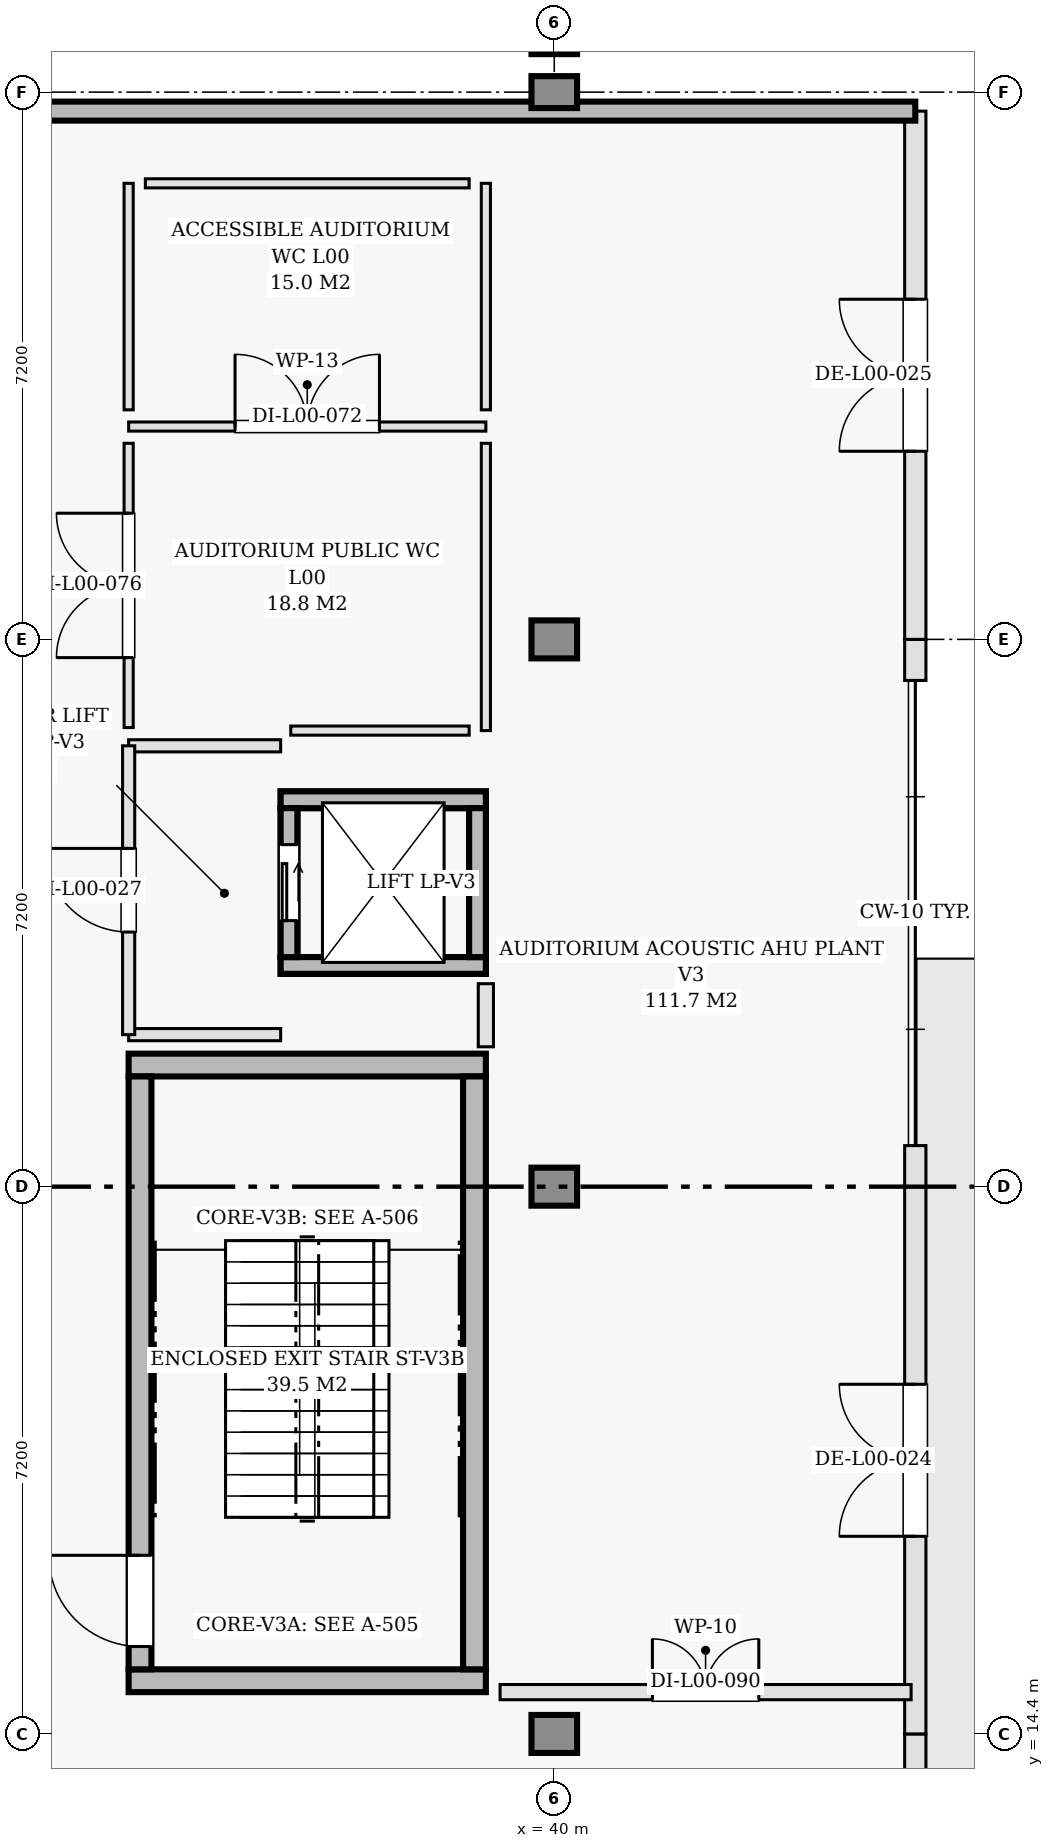
"""IFC4 building model, lengths in metres.
Left out: names, types, materials, properties, quantities, classifications, styles, units other than length and angle.
Written with IfcOpenShell. Run it as: python <this file> out.ifc"""

import sys

from ifc_helpers import new_model, si_unit, direction, frame, frame_2d, origin, origin_2d, place, context, subcontext, project, spatial, rectangle, extrude, element, fill, save


model = new_model("IFC4")
c1 = context("Model", 3, precision=1e-05, world=origin(), true_north=direction((0.0, 1.0)))
c2 = subcontext(c1, "Body", "Model", "MODEL_VIEW")
j1 = project(units=[si_unit("LENGTHUNIT", "METRE"), si_unit("PLANEANGLEUNIT", "RADIAN")], contexts=[c1])
p1 = place(None, origin())
s1 = spatial("IfcSite", under=j1, at=p1, CompositionType="ELEMENT")
p2 = place(p1, origin())
s2 = spatial("IfcBuilding", under=s1, at=p2, CompositionType="ELEMENT")
p3 = place(p2, origin())
s3 = spatial("IfcBuildingStorey", under=s2, at=p3, CompositionType="ELEMENT", Elevation=0.0)
for number, where, z_axis, x_axis in (
    (1, (40.0, 14.4, 0.0), (0.0, 0.0, 1.0), (1.0, 0.0, 0.0)),
    (2, (40.0, 21.6, 0.0), (0.0, 0.0, 1.0), (1.0, 0.0, 0.0)),
    (3, (40.0, 28.8, 0.0), (0.0, 0.0, 1.0), (1.0, 0.0, 0.0)),
):
    element("IfcColumn", number, at=place(p3, frame(where, z_axis=z_axis, x_axis=x_axis)), inside=s3, PredefinedType="COLUMN", context=c2, shape_type="SweptSolid", body=[
        extrude(rectangle(XDim=0.5, YDim=0.5, at=origin_2d()), origin(), (0.0, 0.0, 1.0), 4.8),
    ])
p4 = place(p3, frame((40.0, 36.0, 0.0), z_axis=(0.0, 0.0, 1.0), x_axis=(1.0, 0.0, 0.0)))
e4 = element("IfcColumn", 4, at=p4, inside=s3, PredefinedType="COLUMN", context=c2, shape_type="SweptSolid", body=[
    extrude(rectangle(XDim=0.42, YDim=0.42, at=origin_2d()), origin(), (0.0, 0.0, 1.0), 4.8),
])
p5 = place(p3, frame((40.0, 36.75, 0.0), z_axis=(0.0, 0.0, 1.0), x_axis=(1.0, 0.0, 0.0)))
e5 = element("IfcColumn", 5, at=p5, inside=s3, PredefinedType="COLUMN", context=c2, shape_type="SweptSolid", body=[
    extrude(rectangle(XDim=0.5, YDim=0.5, at=origin_2d()), origin(), (0.0, 0.0, 1.0), 4.8),
])
p6 = place(p3, frame((44.75, 7.2, 0.0), z_axis=(0.0, 0.0, 1.0), x_axis=(0.0, 1.0, 0.0)))
e6 = element("IfcWall", 6, at=p6, inside=s3, PredefinedType="SOLIDWALL", context=c2, shape_type="SweptSolid", body=[
    extrude(rectangle(XDim=7.2, YDim=0.28, at=frame_2d((3.6, 0.0))), origin(), (0.0, 0.0, 1.0), 3.905),
])
p7 = place(p6, frame((4.4, 0.0, 0.0)))
e7 = element("IfcOpeningElement", 7, at=p7, cuts=e6, PredefinedType="OPENING", context=c2, shape_type="SweptSolid", body=[
    extrude(rectangle(XDim=1.8, YDim=2.2, at=frame_2d((0.9, 1.1))), frame((0.0, 0.15, 0.0), z_axis=(0.0, -1.0, 0.0), x_axis=(1.0, 0.0, 0.0)), (0.0, 0.0, 1.0), 0.3),
])
p8 = place(p3, frame((44.75, 14.4, 0.0), z_axis=(0.0, 0.0, 1.0), x_axis=(0.0, 1.0, 0.0)))
e8 = element("IfcWall", 8, at=p8, inside=s3, PredefinedType="SOLIDWALL", context=c2, shape_type="SweptSolid", body=[
    extrude(rectangle(XDim=7.2, YDim=0.28, at=frame_2d((3.6, 0.0))), origin(), (0.0, 0.0, 1.0), 3.905),
])
p9 = place(p8, frame((2.6, 0.0, 0.0)))
e9 = element("IfcOpeningElement", 9, at=p9, cuts=e8, PredefinedType="OPENING", context=c2, shape_type="SweptSolid", body=[
    extrude(rectangle(XDim=2.0, YDim=2.3, at=frame_2d((1.0, 1.15))), frame((0.0, 0.15, 0.0), z_axis=(0.0, -1.0, 0.0), x_axis=(1.0, 0.0, 0.0)), (0.0, 0.0, 1.0), 0.3),
])
p10 = place(p3, frame((44.75, 21.6, 0.0), z_axis=(0.0, 0.0, 1.0), x_axis=(0.0, 1.0, 0.0)))
e10 = element("IfcWall", 10, at=p10, inside=s3, PredefinedType="SOLIDWALL", context=c2, shape_type="SweptSolid", body=[
    extrude(rectangle(XDim=0.54, YDim=0.28, at=frame_2d((0.27, 0.0))), origin(), (0.0, 0.0, 1.0), 3.905),
])
p11 = place(p3, frame((44.75, 28.26, 0.0), z_axis=(0.0, 0.0, 1.0), x_axis=(0.0, 1.0, 0.0)))
e11 = element("IfcWall", 11, at=p11, inside=s3, PredefinedType="SOLIDWALL", context=c2, shape_type="SweptSolid", body=[
    extrude(rectangle(XDim=0.54, YDim=0.28, at=frame_2d((0.27, 0.0))), origin(), (0.0, 0.0, 1.0), 3.905),
])
p12 = place(p3, frame((44.75, 28.8, 0.0), z_axis=(0.0, 0.0, 1.0), x_axis=(0.0, 1.0, 0.0)))
e12 = element("IfcWall", 12, at=p12, inside=s3, PredefinedType="SOLIDWALL", context=c2, shape_type="SweptSolid", body=[
    extrude(rectangle(XDim=6.95, YDim=0.28, at=frame_2d((3.475, 0.0))), origin(), (0.0, 0.0, 1.0), 3.905),
])
p13 = place(p12, frame((2.475, 0.0, 0.0)))
e13 = element("IfcOpeningElement", 13, at=p13, cuts=e12, PredefinedType="OPENING", context=c2, shape_type="SweptSolid", body=[
    extrude(rectangle(XDim=2.0, YDim=2.3, at=frame_2d((1.0, 1.15))), frame((0.0, 0.15, 0.0), z_axis=(0.0, -1.0, 0.0), x_axis=(1.0, 0.0, 0.0)), (0.0, 0.0, 1.0), 0.3),
])
p14 = place(p3, frame((44.75, 35.75, 0.0), z_axis=(0.0, 0.0, 1.0), x_axis=(-1.0, 0.0, 0.0)))
e14 = element("IfcWall", 14, at=p14, inside=s3, PredefinedType="SHEAR", context=c2, shape_type="SweptSolid", body=[
    extrude(rectangle(XDim=41.75, YDim=0.25, at=frame_2d((20.875, 0.0))), origin(), (0.0, 0.0, 1.0), 4.52),
])
for number, where, z_axis, x_axis in (
    (15, (34.4, 15.1, 0.0), (0.0, 0.0, 1.0), (1.0, 0.0, 0.0)),
    (16, (34.4, 23.2, 0.0), (0.0, 0.0, 1.0), (1.0, 0.0, 0.0)),
):
    element("IfcWall", number, at=place(p3, frame(where, z_axis=z_axis, x_axis=x_axis)), inside=s3, PredefinedType="SHEAR", context=c2, shape_type="SweptSolid", body=[
        extrude(rectangle(XDim=4.7, YDim=0.3, at=frame_2d((2.35, 0.0))), origin(), (0.0, 0.0, 1.0), 4.52),
    ])
p15 = place(p3, frame((34.55, 15.25, 0.0), z_axis=(0.0, 0.0, 1.0), x_axis=(0.0, 1.0, 0.0)))
e17 = element("IfcWall", 17, at=p15, inside=s3, PredefinedType="SHEAR", context=c2, shape_type="SweptSolid", body=[
    extrude(rectangle(XDim=7.8, YDim=0.3, at=frame_2d((3.9, 0.0))), origin(), (0.0, 0.0, 1.0), 4.52),
])
p16 = place(p15, frame((0.3, 0.0, 0.0)))
e18 = element("IfcOpeningElement", 18, at=p16, cuts=e17, PredefinedType="OPENING", context=c2, shape_type="SweptSolid", body=[
    extrude(rectangle(XDim=1.2, YDim=2.15, at=frame_2d((0.6, 1.075))), frame((0.0, 0.16, 0.0), z_axis=(0.0, -1.0, 0.0), x_axis=(1.0, 0.0, 0.0)), (0.0, 0.0, 1.0), 0.32),
])
p17 = place(p3, frame((38.95, 15.25, 0.0), z_axis=(0.0, 0.0, 1.0), x_axis=(0.0, 1.0, 0.0)))
e19 = element("IfcWall", 19, at=p17, inside=s3, PredefinedType="SHEAR", context=c2, shape_type="SweptSolid", body=[
    extrude(rectangle(XDim=7.8, YDim=0.3, at=frame_2d((3.9, 0.0))), origin(), (0.0, 0.0, 1.0), 4.52),
])
for number, where, z_axis, x_axis in (
    (20, (36.4, 24.51, -1.4), (0.0, 0.0, 1.0), (1.0, 0.0, 0.0)),
    (21, (36.4, 26.69, -1.4), (0.0, 0.0, 1.0), (1.0, 0.0, 0.0)),
):
    element("IfcWall", number, at=place(p3, frame(where, z_axis=z_axis, x_axis=x_axis)), inside=s3, PredefinedType="SHEAR", context=c2, shape_type="SweptSolid", body=[
        extrude(rectangle(XDim=2.7, YDim=0.22, at=frame_2d((1.35, 0.0))), origin(), (0.0, 0.0, 1.0), 1.05),
    ])
for number, where, z_axis, x_axis in (
    (22, (36.51, 24.62, -1.4), (0.0, 0.0, 1.0), (0.0, 1.0, 0.0)),
    (23, (38.99, 24.62, -1.4), (0.0, 0.0, 1.0), (0.0, 1.0, 0.0)),
):
    element("IfcWall", number, at=place(p3, frame(where, z_axis=z_axis, x_axis=x_axis)), inside=s3, PredefinedType="SHEAR", context=c2, shape_type="SweptSolid", body=[
        extrude(rectangle(XDim=1.96, YDim=0.22, at=frame_2d((0.98, 0.0))), origin(), (0.0, 0.0, 1.0), 1.05),
    ])
for number, where, z_axis, x_axis in (
    (24, (36.4, 24.51, 0.0), (0.0, 0.0, 1.0), (1.0, 0.0, 0.0)),
    (25, (36.4, 26.69, 0.0), (0.0, 0.0, 1.0), (1.0, 0.0, 0.0)),
):
    element("IfcWall", number, at=place(p3, frame(where, z_axis=z_axis, x_axis=x_axis)), inside=s3, PredefinedType="SHEAR", context=c2, shape_type="SweptSolid", body=[
        extrude(rectangle(XDim=2.7, YDim=0.22, at=frame_2d((1.35, 0.0))), origin(), (0.0, 0.0, 1.0), 4.52),
    ])
p18 = place(p3, frame((36.51, 24.62, 0.0), z_axis=(0.0, 0.0, 1.0), x_axis=(0.0, 1.0, 0.0)))
e26 = element("IfcWall", 26, at=p18, inside=s3, PredefinedType="SHEAR", context=c2, shape_type="SweptSolid", body=[
    extrude(rectangle(XDim=1.96, YDim=0.22, at=frame_2d((0.98, 0.0))), origin(), (0.0, 0.0, 1.0), 4.52),
])
p19 = place(p18, frame((0.48, 0.0, 0.0)))
e27 = element("IfcOpeningElement", 27, at=p19, cuts=e26, PredefinedType="OPENING", context=c2, shape_type="SweptSolid", body=[
    extrude(rectangle(XDim=1.0, YDim=2.15, at=frame_2d((0.5, 1.075))), frame((0.0, 0.12, 0.0), z_axis=(0.0, -1.0, 0.0), x_axis=(1.0, 0.0, 0.0)), (0.0, 0.0, 1.0), 0.24),
])
p20 = place(p3, frame((38.99, 24.62, 0.0), z_axis=(0.0, 0.0, 1.0), x_axis=(0.0, 1.0, 0.0)))
e28 = element("IfcWall", 28, at=p20, inside=s3, PredefinedType="SHEAR", context=c2, shape_type="SweptSolid", body=[
    extrude(rectangle(XDim=1.96, YDim=0.22, at=frame_2d((0.98, 0.0))), origin(), (0.0, 0.0, 1.0), 4.52),
])
for number, where, z_axis, x_axis in (
    (29, (34.4, 23.6, 0.0), (0.0, 0.0, 1.0), (1.0, 0.0, 0.0)),
    (30, (34.4, 27.4, 0.0), (0.0, 0.0, 1.0), (1.0, 0.0, 0.0)),
):
    element("IfcWall", number, at=place(p3, frame(where, z_axis=z_axis, x_axis=x_axis)), inside=s3, PredefinedType="PARTITIONING", context=c2, shape_type="SweptSolid", body=[
        extrude(rectangle(XDim=2.0, YDim=0.16, at=frame_2d((1.0, 0.0))), origin(), (0.0, 0.0, 1.0), 4.52),
    ])
p21 = place(p3, frame((34.4, 23.6, 0.0), z_axis=(0.0, 0.0, 1.0), x_axis=(0.0, 1.0, 0.0)))
e31 = element("IfcWall", 31, at=p21, inside=s3, PredefinedType="PARTITIONING", context=c2, shape_type="SweptSolid", body=[
    extrude(rectangle(XDim=3.8, YDim=0.16, at=frame_2d((1.9, 0.0))), origin(), (0.0, 0.0, 1.0), 4.235),
])
p22 = place(p21, frame((1.35, 0.0, 0.0)))
e32 = element("IfcOpeningElement", 32, at=p22, cuts=e31, PredefinedType="OPENING", context=c2, shape_type="SweptSolid", body=[
    extrude(rectangle(XDim=1.1, YDim=2.15, at=frame_2d((0.55, 1.075))), frame((0.0, 0.09, 0.0), z_axis=(0.0, -1.0, 0.0), x_axis=(1.0, 0.0, 0.0)), (0.0, 0.0, 1.0), 0.18),
])
p23 = place(p3, frame((34.4, 31.6, 0.0), z_axis=(0.0, 0.0, 1.0), x_axis=(1.0, 0.0, 0.0)))
e33 = element("IfcWall", 33, at=p23, inside=s3, PredefinedType="PARTITIONING", context=c2, shape_type="SweptSolid", body=[
    extrude(rectangle(XDim=4.7, YDim=0.12, at=frame_2d((2.35, 0.0))), origin(), (0.0, 0.0, 1.0), 4.52),
])
p24 = place(p23, frame((1.4, 0.0, 0.0)))
e34 = element("IfcOpeningElement", 34, at=p24, cuts=e33, PredefinedType="OPENING", context=c2, shape_type="SweptSolid", body=[
    extrude(rectangle(XDim=1.9, YDim=2.25, at=frame_2d((0.95, 1.125))), frame((0.0, 0.07, 0.0), z_axis=(0.0, -1.0, 0.0), x_axis=(1.0, 0.0, 0.0)), (0.0, 0.0, 1.0), 0.14),
])
for number, where, z_axis, x_axis in (
    (35, (39.1, 31.82, 0.0), (0.0, 0.0, 1.0), (0.0, 1.0, 0.0)),
    (36, (34.4, 31.82, 0.0), (0.0, 0.0, 1.0), (0.0, 1.0, 0.0)),
):
    element("IfcWall", number, at=place(p3, frame(where, z_axis=z_axis, x_axis=x_axis)), inside=s3, PredefinedType="PARTITIONING", context=c2, shape_type="SweptSolid", body=[
        extrude(rectangle(XDim=2.98, YDim=0.12, at=frame_2d((1.49, 0.0))), origin(), (0.0, 0.0, 1.0), 4.235),
    ])
p25 = place(p3, frame((34.62, 34.8, 0.0), z_axis=(0.0, 0.0, 1.0), x_axis=(1.0, 0.0, 0.0)))
e37 = element("IfcWall", 37, at=p25, inside=s3, PredefinedType="PARTITIONING", context=c2, shape_type="SweptSolid", body=[
    extrude(rectangle(XDim=4.26, YDim=0.12, at=frame_2d((2.13, 0.0))), origin(), (0.0, 0.0, 1.0), 4.52),
])
p26 = place(p3, frame((39.1, 27.6, 0.0), z_axis=(0.0, 0.0, 1.0), x_axis=(0.0, 1.0, 0.0)))
e38 = element("IfcWall", 38, at=p26, inside=s3, PredefinedType="PARTITIONING", context=c2, shape_type="SweptSolid", body=[
    extrude(rectangle(XDim=3.78, YDim=0.12, at=frame_2d((1.89, 0.0))), origin(), (0.0, 0.0, 1.0), 3.905),
])
p27 = place(p3, frame((36.533, 27.6, 0.0), z_axis=(0.0, 0.0, 1.0), x_axis=(1.0, 0.0, 0.0)))
e39 = element("IfcWall", 39, at=p27, inside=s3, PredefinedType="PARTITIONING", context=c2, shape_type="SweptSolid", body=[
    extrude(rectangle(XDim=2.347, YDim=0.12, at=frame_2d((1.173, 0.0))), origin(), (0.0, 0.0, 1.0), 4.52),
])
p28 = place(p3, frame((34.4, 27.64, 0.0), z_axis=(0.0, 0.0, 1.0), x_axis=(0.0, 1.0, 0.0)))
e40 = element("IfcWall", 40, at=p28, inside=s3, PredefinedType="PARTITIONING", context=c2, shape_type="SweptSolid", body=[
    extrude(rectangle(XDim=3.74, YDim=0.12, at=frame_2d((1.87, 0.0))), origin(), (0.0, 0.0, 1.0), 3.905),
])
p29 = place(p28, frame((0.92, 0.0, 0.0)))
e41 = element("IfcOpeningElement", 41, at=p29, cuts=e40, PredefinedType="OPENING", context=c2, shape_type="SweptSolid", body=[
    extrude(rectangle(XDim=1.9, YDim=2.25, at=frame_2d((0.95, 1.125))), frame((0.0, 0.07, 0.0), z_axis=(0.0, -1.0, 0.0), x_axis=(1.0, 0.0, 0.0)), (0.0, 0.0, 1.0), 0.14),
])
p30 = place(p3, frame((39.287, 14.95, 0.0), z_axis=(0.0, 0.0, 1.0), x_axis=(1.0, 0.0, 0.0)))
e42 = element("IfcWall", 42, at=p30, inside=s3, PredefinedType="PARTITIONING", context=c2, shape_type="SweptSolid", body=[
    extrude(rectangle(XDim=5.408, YDim=0.2, at=frame_2d((2.704, 0.0))), origin(), (0.0, 0.0, 1.0), 3.955),
])
p31 = place(p30, frame((2.004, 0.0, 0.0)))
e43 = element("IfcOpeningElement", 43, at=p31, cuts=e42, PredefinedType="OPENING", context=c2, shape_type="SweptSolid", body=[
    extrude(rectangle(XDim=1.4, YDim=2.15, at=frame_2d((0.7, 1.075))), frame((0.0, 0.11, 0.0), z_axis=(0.0, -1.0, 0.0), x_axis=(1.0, 0.0, 0.0)), (0.0, 0.0, 1.0), 0.22),
])
p32 = place(p3, frame((39.1, 23.44, 0.0), z_axis=(0.0, 0.0, 1.0), x_axis=(0.0, 1.0, 0.0)))
e44 = element("IfcWall", 44, at=p32, inside=s3, PredefinedType="PARTITIONING", context=c2, shape_type="SweptSolid", body=[
    extrude(rectangle(XDim=0.83, YDim=0.2, at=frame_2d((0.415, 0.0))), origin(), (0.0, 0.0, 1.0), 4.235),
])
p33 = place(p9, origin())
e45 = element("IfcDoor", 45, at=p33, inside=s3, OperationType="DOUBLE_DOOR_SINGLE_SWING", PredefinedType="DOOR", context=c2, shape_type="SweptSolid", body=[
    extrude(rectangle(XDim=2.0, YDim=2.3, at=frame_2d((1.0, 1.15))), frame((0.0, 0.025, 0.0), z_axis=(0.0, -1.0, 0.0), x_axis=(1.0, 0.0, 0.0)), (0.0, 0.0, 1.0), 0.05),
])
fill(e9, e45)
p34 = place(p13, origin())
e46 = element("IfcDoor", 46, at=p34, inside=s3, OperationType="DOUBLE_DOOR_SINGLE_SWING", PredefinedType="DOOR", context=c2, shape_type="SweptSolid", body=[
    extrude(rectangle(XDim=2.0, YDim=2.3, at=frame_2d((1.0, 1.15))), frame((0.0, 0.025, 0.0), z_axis=(0.0, -1.0, 0.0), x_axis=(1.0, 0.0, 0.0)), (0.0, 0.0, 1.0), 0.05),
])
fill(e13, e46)
p35 = place(p16, origin())
e47 = element("IfcDoor", 47, at=p35, inside=s3, OperationType="SINGLE_SWING_RIGHT", PredefinedType="DOOR", context=c2, shape_type="SweptSolid", body=[
    extrude(rectangle(XDim=1.2, YDim=2.15, at=frame_2d((0.6, 1.075))), frame((0.0, 0.025, 0.0), z_axis=(0.0, -1.0, 0.0), x_axis=(1.0, 0.0, 0.0)), (0.0, 0.0, 1.0), 0.05),
])
fill(e18, e47)
p36 = place(p19, origin())
e48 = element("IfcDoor", 48, at=p36, inside=s3, OperationType="SLIDING_TO_LEFT", PredefinedType="DOOR", context=c2, shape_type="SweptSolid", body=[
    extrude(rectangle(XDim=1.0, YDim=2.15, at=frame_2d((0.5, 1.075))), frame((0.0, 0.025, 0.0), z_axis=(0.0, -1.0, 0.0), x_axis=(1.0, 0.0, 0.0)), (0.0, 0.0, 1.0), 0.05),
])
fill(e27, e48)
p37 = place(p22, origin())
e49 = element("IfcDoor", 49, at=p37, inside=s3, OperationType="SINGLE_SWING_RIGHT", PredefinedType="DOOR", context=c2, shape_type="SweptSolid", body=[
    extrude(rectangle(XDim=1.1, YDim=2.15, at=frame_2d((0.55, 1.075))), frame((0.0, 0.025, 0.0), z_axis=(0.0, -1.0, 0.0), x_axis=(1.0, 0.0, 0.0)), (0.0, 0.0, 1.0), 0.05),
])
fill(e32, e49)
p38 = place(p24, origin())
e50 = element("IfcDoor", 50, at=p38, inside=s3, OperationType="DOUBLE_DOOR_SINGLE_SWING", PredefinedType="DOOR", context=c2, shape_type="SweptSolid", body=[
    extrude(rectangle(XDim=1.9, YDim=2.25, at=frame_2d((0.95, 1.125))), frame((0.0, 0.025, 0.0), z_axis=(0.0, -1.0, 0.0), x_axis=(1.0, 0.0, 0.0)), (0.0, 0.0, 1.0), 0.05),
])
fill(e34, e50)
p39 = place(p29, origin())
e51 = element("IfcDoor", 51, at=p39, inside=s3, OperationType="DOUBLE_DOOR_SINGLE_SWING", PredefinedType="DOOR", context=c2, shape_type="SweptSolid", body=[
    extrude(rectangle(XDim=1.9, YDim=2.25, at=frame_2d((0.95, 1.125))), frame((0.0, 0.025, 0.0), z_axis=(0.0, -1.0, 0.0), x_axis=(1.0, 0.0, 0.0)), (0.0, 0.0, 1.0), 0.05),
])
fill(e41, e51)
p40 = place(p31, origin())
e52 = element("IfcDoor", 52, at=p40, inside=s3, OperationType="DOUBLE_DOOR_SINGLE_SWING", PredefinedType="DOOR", context=c2, shape_type="SweptSolid", body=[
    extrude(rectangle(XDim=1.4, YDim=2.15, at=frame_2d((0.7, 1.075))), frame((0.0, 0.025, 0.0), z_axis=(0.0, -1.0, 0.0), x_axis=(1.0, 0.0, 0.0)), (0.0, 0.0, 1.0), 0.05),
])
fill(e43, e52)
save(model, sys.argv[1])
